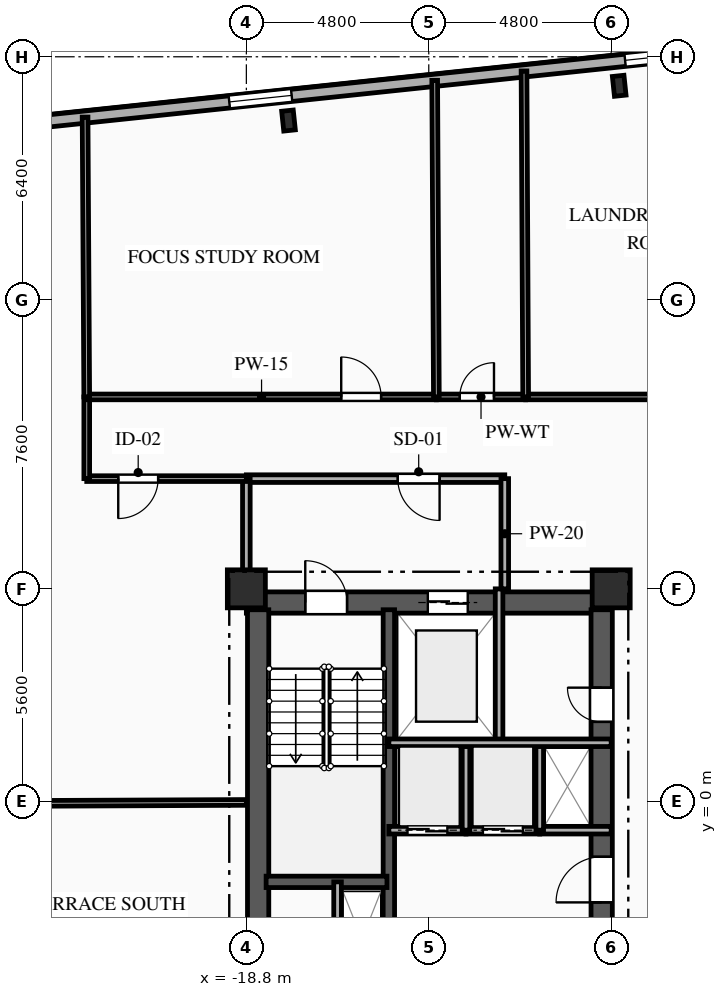
"""IFC4 building model, lengths in metres.
Left out: names, types, materials, properties, quantities, classifications, styles, units other than length and angle.
Written with IfcOpenShell. Run it as: python <this file> out.ifc"""

import sys

from ifc_helpers import new_model, si_unit, direction, frame, frame_2d, origin, origin_2d, place, context, subcontext, project, spatial, rectangle, i_section, extrude, element, fill, save


model = new_model("IFC4")
c1 = context("Model", 3, precision=1e-05, world=origin(), true_north=direction((0.0, 1.0)))
c2 = subcontext(c1, "Body", "Model", "MODEL_VIEW")
j1 = project(units=[si_unit("LENGTHUNIT", "METRE"), si_unit("PLANEANGLEUNIT", "RADIAN")], contexts=[c1])
p1 = place(None, origin())
s1 = spatial("IfcSite", under=j1, at=p1, CompositionType="ELEMENT")
p2 = place(p1, origin())
s2 = spatial("IfcBuilding", under=s1, at=p2, CompositionType="ELEMENT")
p3 = place(p2, frame((0.0, 0.0, 79.0)))
s3 = spatial("IfcBuildingStorey", under=s2, at=p3, CompositionType="ELEMENT", Elevation=79.0)
for number, where, z_axis, x_axis in (
    (1, (-18.8, 5.6, 0.0), (0.0, 0.0, 1.0), (1.0, 0.0, 0.0)),
    (2, (-9.2, 5.6, 0.0), (0.0, 0.0, 1.0), (1.0, 0.0, 0.0)),
):
    element("IfcColumn", number, at=place(p3, frame(where, z_axis=z_axis, x_axis=x_axis)), inside=s3, PredefinedType="COLUMN", context=c2, shape_type="SweptSolid", body=[
        extrude(rectangle(XDim=1.0, YDim=1.0, at=origin_2d()), origin(), (0.0, 0.0, 1.0), 3.35),
    ])
for number, where, z_axis, x_axis in (
    (3, (-8.989, 18.836, 0.0), (0.0, 0.0, 1.0), (0.995, 0.105, 0.0)),
    (4, (-17.691, 17.922, 0.0), (0.0, 0.0, 1.0), (0.995, 0.105, 0.0)),
):
    element("IfcColumn", number, at=place(p3, frame(where, z_axis=z_axis, x_axis=x_axis)), inside=s3, PredefinedType="COLUMN", context=c2, shape_type="SweptSolid", body=[
        extrude(i_section(OverallWidth=0.306, OverallDepth=0.524, WebThickness=0.021, FlangeThickness=0.04, FilletRadius=0.027, at=origin_2d()), origin(), (0.0, 0.0, 1.0), 3.35),
    ])
p4 = place(p3, frame((-27.107, 17.586, 0.0), z_axis=(0.0, 0.0, 1.0), x_axis=(0.994521628355, 0.104531003701, 0.0)))
e5 = element("IfcWall", 5, at=p4, inside=s3, PredefinedType="SOLIDWALL", context=c2, shape_type="SweptSolid", body=[
    extrude(rectangle(XDim=53.8, YDim=0.32, at=frame_2d((26.9, 0.0))), origin(), (0.0, 0.0, 1.0), 3.045),
])
p5 = place(p4, frame((1.482, 0.0, 0.85)))
e6 = element("IfcOpeningElement", 6, at=p5, cuts=e5, PredefinedType="OPENING", context=c2, shape_type="SweptSolid", body=[
    extrude(rectangle(XDim=1.6, YDim=1.85, at=frame_2d((0.8, 0.925))), frame((0.0, 0.17, 0.0), z_axis=(0.0, -1.0, 0.0), x_axis=(1.0, 0.0, 0.0)), (0.0, 0.0, 1.0), 0.34),
])
p6 = place(p4, frame((7.902, 0.0, 0.85)))
e7 = element("IfcOpeningElement", 7, at=p6, cuts=e5, PredefinedType="OPENING", context=c2, shape_type="SweptSolid", body=[
    extrude(rectangle(XDim=1.65, YDim=1.85, at=frame_2d((0.825, 0.925))), frame((0.0, 0.17, 0.0), z_axis=(0.0, -1.0, 0.0), x_axis=(1.0, 0.0, 0.0)), (0.0, 0.0, 1.0), 0.34),
])
p7 = place(p4, frame((18.374, 0.0, 0.85)))
e8 = element("IfcOpeningElement", 8, at=p7, cuts=e5, PredefinedType="OPENING", context=c2, shape_type="SweptSolid", body=[
    extrude(rectangle(XDim=1.6, YDim=1.85, at=frame_2d((0.8, 0.925))), frame((0.0, 0.17, 0.0), z_axis=(0.0, -1.0, 0.0), x_axis=(1.0, 0.0, 0.0)), (0.0, 0.0, 1.0), 0.34),
])
p8 = place(p4, frame((26.16, 0.0, 0.85)))
e9 = element("IfcOpeningElement", 9, at=p8, cuts=e5, PredefinedType="OPENING", context=c2, shape_type="SweptSolid", body=[
    extrude(rectangle(XDim=2.2, YDim=1.85, at=frame_2d((1.1, 0.925))), frame((0.0, 0.17, 0.0), z_axis=(0.0, -1.0, 0.0), x_axis=(1.0, 0.0, 0.0)), (0.0, 0.0, 1.0), 0.34),
])
p9 = place(p4, frame((35.407, 0.0, 0.85)))
e10 = element("IfcOpeningElement", 10, at=p9, cuts=e5, PredefinedType="OPENING", context=c2, shape_type="SweptSolid", body=[
    extrude(rectangle(XDim=2.2, YDim=1.85, at=frame_2d((1.1, 0.925))), frame((0.0, 0.17, 0.0), z_axis=(0.0, -1.0, 0.0), x_axis=(1.0, 0.0, 0.0)), (0.0, 0.0, 1.0), 0.34),
])
p10 = place(p4, frame((42.607, 0.0, 0.85)))
e11 = element("IfcOpeningElement", 11, at=p10, cuts=e5, PredefinedType="OPENING", context=c2, shape_type="SweptSolid", body=[
    extrude(rectangle(XDim=1.65, YDim=1.85, at=frame_2d((0.825, 0.925))), frame((0.0, 0.17, 0.0), z_axis=(0.0, -1.0, 0.0), x_axis=(1.0, 0.0, 0.0)), (0.0, 0.0, 1.0), 0.34),
])
p11 = place(p4, frame((47.211, 0.0, 0.85)))
e12 = element("IfcOpeningElement", 12, at=p11, cuts=e5, PredefinedType="OPENING", context=c2, shape_type="SweptSolid", body=[
    extrude(rectangle(XDim=1.65, YDim=1.85, at=frame_2d((0.825, 0.925))), frame((0.0, 0.17, 0.0), z_axis=(0.0, -1.0, 0.0), x_axis=(1.0, 0.0, 0.0)), (0.0, 0.0, 1.0), 0.34),
])
p12 = place(p3, frame((-18.8, 5.24, 0.0), z_axis=(0.0, 0.0, 1.0), x_axis=(1.0, 0.0, 0.0)))
e13 = element("IfcWall", 13, at=p12, inside=s3, PredefinedType="SHEAR", context=c2, shape_type="SweptSolid", body=[
    extrude(rectangle(XDim=9.6, YDim=0.56, at=frame_2d((4.8, 0.0))), origin(), (0.0, 0.0, 1.0), 3.045),
])
p13 = place(p12, frame((1.55, 0.0, 0.0)))
e14 = element("IfcOpeningElement", 14, at=p13, cuts=e13, PredefinedType="OPENING", context=c2, shape_type="SweptSolid", body=[
    extrude(rectangle(XDim=1.1, YDim=2.15, at=frame_2d((0.55, 1.075))), frame((0.0, 0.29, 0.0), z_axis=(0.0, -1.0, 0.0), x_axis=(1.0, 0.0, 0.0)), (0.0, 0.0, 1.0), 0.58),
])
p14 = place(p12, frame((4.775, 0.0, 0.0)))
e15 = element("IfcOpeningElement", 15, at=p14, cuts=e13, PredefinedType="OPENING", context=c2, shape_type="SweptSolid", body=[
    extrude(rectangle(XDim=1.05, YDim=2.1, at=frame_2d((0.525, 1.05))), frame((0.0, 0.29, 0.0), z_axis=(0.0, -1.0, 0.0), x_axis=(1.0, 0.0, 0.0)), (0.0, 0.0, 1.0), 0.58),
])
p15 = place(p3, frame((-18.49, -5.05, 0.0), z_axis=(0.0, 0.0, 1.0), x_axis=(0.0, 1.0, 0.0)))
e16 = element("IfcWall", 16, at=p15, inside=s3, PredefinedType="SHEAR", context=c2, shape_type="SweptSolid", body=[
    extrude(rectangle(XDim=10.1, YDim=0.56, at=frame_2d((5.05, 0.0))), origin(), (0.0, 0.0, 1.0), 3.045),
])
p16 = place(p3, frame((-9.45, -5.05, 0.0), z_axis=(0.0, 0.0, 1.0), x_axis=(0.0, 1.0, 0.0)))
e17 = element("IfcWall", 17, at=p16, inside=s3, PredefinedType="SHEAR", context=c2, shape_type="SweptSolid", body=[
    extrude(rectangle(XDim=10.1, YDim=0.56, at=frame_2d((5.05, 0.0))), origin(), (0.0, 0.0, 1.0), 3.045),
])
p17 = place(p16, frame((7.15, 0.0, 0.0)))
e18 = element("IfcOpeningElement", 18, at=p17, cuts=e17, PredefinedType="OPENING", context=c2, shape_type="SweptSolid", body=[
    extrude(rectangle(XDim=0.9, YDim=2.1, at=frame_2d((0.45, 1.05))), frame((0.0, 0.29, 0.0), z_axis=(0.0, -1.0, 0.0), x_axis=(1.0, 0.0, 0.0)), (0.0, 0.0, 1.0), 0.58),
])
p18 = place(p16, frame((2.4, 0.0, 0.0)))
e19 = element("IfcOpeningElement", 19, at=p18, cuts=e17, PredefinedType="OPENING", context=c2, shape_type="SweptSolid", body=[
    extrude(rectangle(XDim=1.2, YDim=2.15, at=frame_2d((0.6, 1.075))), frame((0.0, 0.29, 0.0), z_axis=(0.0, -1.0, 0.0), x_axis=(1.0, 0.0, 0.0)), (0.0, 0.0, 1.0), 0.58),
])
p19 = place(p3, frame((-15.05, -5.05, 0.0), z_axis=(0.0, 0.0, 1.0), x_axis=(0.0, 1.0, 0.0)))
e20 = element("IfcWall", 20, at=p19, inside=s3, PredefinedType="SHEAR", context=c2, shape_type="SweptSolid", body=[
    extrude(rectangle(XDim=10.1, YDim=0.3, at=frame_2d((5.05, 0.0))), origin(), (0.0, 0.0, 1.0), 3.045),
])
p20 = place(p3, frame((-18.28, -2.11, 0.0), z_axis=(0.0, 0.0, 1.0), x_axis=(1.0, 0.0, 0.0)))
e21 = element("IfcWall", 21, at=p20, inside=s3, PredefinedType="SHEAR", context=c2, shape_type="SweptSolid", body=[
    extrude(rectangle(XDim=3.18, YDim=0.3, at=frame_2d((1.59, 0.0))), origin(), (0.0, 0.0, 1.0), 3.045),
])
p21 = place(p3, frame((-16.4, -5.6, 0.0), z_axis=(0.0, 0.0, 1.0), x_axis=(0.0, 1.0, 0.0)))
e22 = element("IfcWall", 22, at=p21, inside=s3, PredefinedType="PARTITIONING", context=c2, shape_type="SweptSolid", body=[
    extrude(rectangle(XDim=3.49, YDim=0.2, at=frame_2d((1.745, 0.0))), origin(), (0.0, 0.0, 1.0), 3.045),
])
p22 = place(p3, frame((-12.15, 1.55, 0.0), z_axis=(0.0, 0.0, 1.0), x_axis=(0.0, 1.0, 0.0)))
e23 = element("IfcWall", 23, at=p22, inside=s3, PredefinedType="PARTITIONING", context=c2, shape_type="SweptSolid", body=[
    extrude(rectangle(XDim=4.05, YDim=0.2, at=frame_2d((2.025, 0.0))), origin(), (0.0, 0.0, 1.0), 3.045),
])
p23 = place(p3, frame((-12.0, 8.5, 0.0), z_axis=(0.0, 0.0, 1.0), x_axis=(-1.0, 0.0, 0.0)))
e24 = element("IfcWall", 24, at=p23, inside=s3, PredefinedType="PARTITIONING", context=c2, shape_type="SweptSolid", body=[
    extrude(rectangle(XDim=6.8, YDim=0.2, at=frame_2d((3.4, 0.0))), origin(), (0.0, 0.0, 1.0), 3.045),
])
p24 = place(p23, frame((1.715, 0.0, 0.0)))
e25 = element("IfcOpeningElement", 25, at=p24, cuts=e24, PredefinedType="OPENING", context=c2, shape_type="SweptSolid", body=[
    extrude(rectangle(XDim=1.1, YDim=2.15, at=frame_2d((0.55, 1.075))), frame((0.0, 0.11, 0.0), z_axis=(0.0, -1.0, 0.0), x_axis=(1.0, 0.0, 0.0)), (0.0, 0.0, 1.0), 0.22),
])
p25 = place(p3, frame((-12.0, 5.6, 0.0), z_axis=(0.0, 0.0, 1.0), x_axis=(0.0, 1.0, 0.0)))
e26 = element("IfcWall", 26, at=p25, inside=s3, PredefinedType="PARTITIONING", context=c2, shape_type="SweptSolid", body=[
    extrude(rectangle(XDim=2.9, YDim=0.2, at=frame_2d((1.45, 0.0))), origin(), (0.0, 0.0, 1.0), 3.045),
])
p26 = place(p3, frame((-18.8, 8.5, 0.0), z_axis=(0.0, 0.0, 1.0), x_axis=(0.0, -1.0, 0.0)))
e27 = element("IfcWall", 27, at=p26, inside=s3, PredefinedType="PARTITIONING", context=c2, shape_type="SweptSolid", body=[
    extrude(rectangle(XDim=2.9, YDim=0.2, at=frame_2d((1.45, 0.0))), origin(), (0.0, 0.0, 1.0), 2.53),
])
p27 = place(p3, frame((-13.02, -0.75, 0.0), z_axis=(0.0, 0.0, 1.0), x_axis=(-1.0, 0.0, 0.0)))
e28 = element("IfcWall", 28, at=p27, inside=s3, PredefinedType="PARTITIONING", context=c2, shape_type="SweptSolid", body=[
    extrude(rectangle(XDim=2.03, YDim=0.2, at=frame_2d((1.015, 0.0))), origin(), (0.0, 0.0, 1.0), 3.045),
])
p28 = place(p27, frame((0.49, 0.0, 0.0)))
e29 = element("IfcOpeningElement", 29, at=p28, cuts=e28, PredefinedType="OPENING", context=c2, shape_type="SweptSolid", body=[
    extrude(rectangle(XDim=1.05, YDim=2.1, at=frame_2d((0.525, 1.05))), frame((0.0, 0.11, 0.0), z_axis=(0.0, -1.0, 0.0), x_axis=(1.0, 0.0, 0.0)), (0.0, 0.0, 1.0), 0.22),
])
p29 = place(p3, frame((-11.08, -0.75, 0.0), z_axis=(0.0, 0.0, 1.0), x_axis=(-1.0, 0.0, 0.0)))
e30 = element("IfcWall", 30, at=p29, inside=s3, PredefinedType="PARTITIONING", context=c2, shape_type="SweptSolid", body=[
    extrude(rectangle(XDim=1.94, YDim=0.2, at=frame_2d((0.97, 0.0))), origin(), (0.0, 0.0, 1.0), 3.045),
])
p30 = place(p29, frame((0.445, 0.0, 0.0)))
e31 = element("IfcOpeningElement", 31, at=p30, cuts=e30, PredefinedType="OPENING", context=c2, shape_type="SweptSolid", body=[
    extrude(rectangle(XDim=1.05, YDim=2.1, at=frame_2d((0.525, 1.05))), frame((0.0, 0.11, 0.0), z_axis=(0.0, -1.0, 0.0), x_axis=(1.0, 0.0, 0.0)), (0.0, 0.0, 1.0), 0.22),
])
p31 = place(p3, frame((-9.2, -0.75, 0.0), z_axis=(0.0, 0.0, 1.0), x_axis=(-1.0, 0.0, 0.0)))
e32 = element("IfcWall", 32, at=p31, inside=s3, PredefinedType="PARTITIONING", context=c2, shape_type="SweptSolid", body=[
    extrude(rectangle(XDim=1.88, YDim=0.2, at=frame_2d((0.94, 0.0))), origin(), (0.0, 0.0, 1.0), 3.045),
])
for number, where, z_axis, x_axis in (
    (33, (-13.02, -0.75, 0.0), (0.0, 0.0, 1.0), (0.0, 1.0, 0.0)),
    (34, (-11.08, -0.75, 0.0), (0.0, 0.0, 1.0), (0.0, 1.0, 0.0)),
):
    element("IfcWall", number, at=place(p3, frame(where, z_axis=z_axis, x_axis=x_axis)), inside=s3, PredefinedType="PARTITIONING", context=c2, shape_type="SweptSolid", body=[
        extrude(rectangle(XDim=2.3, YDim=0.2, at=frame_2d((1.15, 0.0))), origin(), (0.0, 0.0, 1.0), 3.045),
    ])
p32 = place(p3, frame((-18.8, 8.5, 0.0), z_axis=(0.0, 0.0, 1.0), x_axis=(-1.0, 0.0, 0.0)))
e35 = element("IfcWall", 35, at=p32, inside=s3, PredefinedType="PARTITIONING", context=c2, shape_type="SweptSolid", body=[
    extrude(rectangle(XDim=4.2, YDim=0.15, at=frame_2d((2.1, 0.0))), origin(), (0.0, 0.0, 1.0), 3.045),
])
p33 = place(p32, frame((2.321, 0.0, 0.0)))
e36 = element("IfcOpeningElement", 36, at=p33, cuts=e35, PredefinedType="OPENING", context=c2, shape_type="SweptSolid", body=[
    extrude(rectangle(XDim=1.05, YDim=2.15, at=frame_2d((0.525, 1.075))), frame((0.0, 0.085, 0.0), z_axis=(0.0, -1.0, 0.0), x_axis=(1.0, 0.0, 0.0)), (0.0, 0.0, 1.0), 0.17),
])
p34 = place(p3, frame((-23.0, 8.5, 0.0), z_axis=(0.0, 0.0, 1.0), x_axis=(0.0, 1.0, 0.0)))
e37 = element("IfcWall", 37, at=p34, inside=s3, PredefinedType="PARTITIONING", context=c2, shape_type="SweptSolid", body=[
    extrude(rectangle(XDim=2.15, YDim=0.15, at=frame_2d((1.075, 0.0))), origin(), (0.0, 0.0, 1.0), 3.045),
])
p35 = place(p3, frame((-23.0, 10.65, 0.0), z_axis=(0.0, 0.0, 1.0), x_axis=(1.0, 0.0, 0.0)))
e38 = element("IfcWall", 38, at=p35, inside=s3, PredefinedType="PARTITIONING", context=c2, shape_type="SweptSolid", body=[
    extrude(rectangle(XDim=9.2, YDim=0.15, at=frame_2d((4.6, 0.0))), origin(), (0.0, 0.0, 1.0), 3.045),
])
p36 = place(p35, frame((6.696, 0.0, 0.0)))
e39 = element("IfcOpeningElement", 39, at=p36, cuts=e38, PredefinedType="OPENING", context=c2, shape_type="SweptSolid", body=[
    extrude(rectangle(XDim=1.05, YDim=2.15, at=frame_2d((0.525, 1.075))), frame((0.0, 0.085, 0.0), z_axis=(0.0, -1.0, 0.0), x_axis=(1.0, 0.0, 0.0)), (0.0, 0.0, 1.0), 0.17),
])
p37 = place(p3, frame((-13.8, 10.65, 0.0), z_axis=(0.0, 0.0, 1.0), x_axis=(1.0, 0.0, 0.0)))
e40 = element("IfcWall", 40, at=p37, inside=s3, PredefinedType="PLUMBINGWALL", context=c2, shape_type="SweptSolid", body=[
    extrude(rectangle(XDim=2.35, YDim=0.15, at=frame_2d((1.175, 0.0))), origin(), (0.0, 0.0, 1.0), 3.045),
])
p38 = place(p37, frame((0.616, 0.0, 0.0)))
e41 = element("IfcOpeningElement", 41, at=p38, cuts=e40, PredefinedType="OPENING", context=c2, shape_type="SweptSolid", body=[
    extrude(rectangle(XDim=0.9, YDim=2.1, at=frame_2d((0.45, 1.05))), frame((0.0, 0.085, 0.0), z_axis=(0.0, -1.0, 0.0), x_axis=(1.0, 0.0, 0.0)), (0.0, 0.0, 1.0), 0.17),
])
p39 = place(p3, frame((-11.45, 10.65, 0.0), z_axis=(0.0, 0.0, 1.0), x_axis=(1.0, 0.0, 0.0)))
e42 = element("IfcWall", 42, at=p39, inside=s3, PredefinedType="PARTITIONING", context=c2, shape_type="SweptSolid", body=[
    extrude(rectangle(XDim=6.85, YDim=0.15, at=frame_2d((3.425, 0.0))), origin(), (0.0, 0.0, 1.0), 3.045),
])
p40 = place(p39, frame((4.728, 0.0, 0.0)))
e43 = element("IfcOpeningElement", 43, at=p40, cuts=e42, PredefinedType="OPENING", context=c2, shape_type="SweptSolid", body=[
    extrude(rectangle(XDim=0.95, YDim=2.1, at=frame_2d((0.475, 1.05))), frame((0.0, 0.085, 0.0), z_axis=(0.0, -1.0, 0.0), x_axis=(1.0, 0.0, 0.0)), (0.0, 0.0, 1.0), 0.17),
])
p41 = place(p3, frame((-28.671, -0.064, 0.0), z_axis=(0.0, 0.0, 1.0), x_axis=(0.999990089865, 0.004451985263, 0.0)))
e44 = element("IfcWall", 44, at=p41, inside=s3, PredefinedType="PARTITIONING", context=c2, shape_type="SweptSolid", body=[
    extrude(rectangle(XDim=9.871, YDim=0.15, at=frame_2d((4.936, 0.0))), origin(), (0.0, 0.0, 1.0), 3.045),
])
p42 = place(p3, frame((-23.044, 18.013, 0.0), z_axis=(0.0, 0.0, 1.0), x_axis=(0.005968459246, -0.999982188588, 0.0)))
e45 = element("IfcWall", 45, at=p42, inside=s3, PredefinedType="PARTITIONING", context=c2, shape_type="SweptSolid", body=[
    extrude(rectangle(XDim=7.363, YDim=0.15, at=frame_2d((3.682, 0.0))), origin(), (0.0, 0.0, 1.0), 3.045),
])
p43 = place(p3, frame((-13.844, 18.98, 0.0), z_axis=(0.0, 0.0, 1.0), x_axis=(0.005275579446, -0.999986084034, 0.0)))
e46 = element("IfcWall", 46, at=p43, inside=s3, PredefinedType="PLUMBINGWALL", context=c2, shape_type="SweptSolid", body=[
    extrude(rectangle(XDim=8.33, YDim=0.15, at=frame_2d((4.165, 0.0))), origin(), (0.0, 0.0, 1.0), 3.045),
])
p44 = place(p3, frame((-11.494, 19.227, 0.0), z_axis=(0.0, 0.0, 1.0), x_axis=(0.005123612688, -0.99998687421, 0.0)))
e47 = element("IfcWall", 47, at=p44, inside=s3, PredefinedType="PLUMBINGWALL", context=c2, shape_type="SweptSolid", body=[
    extrude(rectangle(XDim=8.577, YDim=0.15, at=frame_2d((4.289, 0.0))), origin(), (0.0, 0.0, 1.0), 3.045),
])
p45 = place(p3, frame((-15.05, 1.55, 0.0), z_axis=(0.0, 0.0, 1.0), x_axis=(1.0, 0.0, 0.0)))
e48 = element("IfcWall", 48, at=p45, inside=s3, PredefinedType="PARTITIONING", context=c2, shape_type="SweptSolid", body=[
    extrude(rectangle(XDim=5.85, YDim=0.2, at=frame_2d((2.925, 0.0))), origin(), (0.0, 0.0, 1.0), 3.045),
])
p46 = place(p6, origin())
e49 = element("IfcWindow", 49, at=p46, inside=s3, PartitioningType="SINGLE_PANEL", PredefinedType="WINDOW", context=c2, shape_type="SweptSolid", body=[
    extrude(rectangle(XDim=1.65, YDim=1.85, at=frame_2d((0.825, 0.925))), frame((0.0, 0.03, 0.0), z_axis=(0.0, -1.0, 0.0), x_axis=(1.0, 0.0, 0.0)), (0.0, 0.0, 1.0), 0.06),
])
fill(e7, e49)
p47 = place(p7, origin())
e50 = element("IfcWindow", 50, at=p47, inside=s3, PartitioningType="SINGLE_PANEL", PredefinedType="WINDOW", context=c2, shape_type="SweptSolid", body=[
    extrude(rectangle(XDim=1.6, YDim=1.85, at=frame_2d((0.8, 0.925))), frame((0.0, 0.03, 0.0), z_axis=(0.0, -1.0, 0.0), x_axis=(1.0, 0.0, 0.0)), (0.0, 0.0, 1.0), 0.06),
])
fill(e8, e50)
p48 = place(p13, origin())
e51 = element("IfcDoor", 51, at=p48, inside=s3, OperationType="SINGLE_SWING_LEFT", PredefinedType="DOOR", context=c2, shape_type="SweptSolid", body=[
    extrude(rectangle(XDim=1.1, YDim=2.15, at=frame_2d((0.55, 1.075))), frame((0.0, 0.025, 0.0), z_axis=(0.0, -1.0, 0.0), x_axis=(1.0, 0.0, 0.0)), (0.0, 0.0, 1.0), 0.05),
])
fill(e14, e51)
p49 = place(p14, origin())
e52 = element("IfcDoor", 52, at=p49, inside=s3, OperationType="DOUBLE_DOOR_SLIDING", PredefinedType="DOOR", context=c2, shape_type="SweptSolid", body=[
    extrude(rectangle(XDim=1.05, YDim=2.1, at=frame_2d((0.525, 1.05))), frame((0.0, 0.025, 0.0), z_axis=(0.0, -1.0, 0.0), x_axis=(1.0, 0.0, 0.0)), (0.0, 0.0, 1.0), 0.05),
])
fill(e15, e52)
p50 = place(p24, origin())
e53 = element("IfcDoor", 53, at=p50, inside=s3, OperationType="SINGLE_SWING_LEFT", PredefinedType="DOOR", context=c2, shape_type="SweptSolid", body=[
    extrude(rectangle(XDim=1.1, YDim=2.15, at=frame_2d((0.55, 1.075))), frame((0.0, 0.025, 0.0), z_axis=(0.0, -1.0, 0.0), x_axis=(1.0, 0.0, 0.0)), (0.0, 0.0, 1.0), 0.05),
])
fill(e25, e53)
p51 = place(p17, origin())
e54 = element("IfcDoor", 54, at=p51, inside=s3, OperationType="SINGLE_SWING_RIGHT", PredefinedType="DOOR", context=c2, shape_type="SweptSolid", body=[
    extrude(rectangle(XDim=0.9, YDim=2.1, at=frame_2d((0.45, 1.05))), frame((0.0, 0.025, 0.0), z_axis=(0.0, -1.0, 0.0), x_axis=(1.0, 0.0, 0.0)), (0.0, 0.0, 1.0), 0.05),
])
fill(e18, e54)
p52 = place(p28, origin())
e55 = element("IfcDoor", 55, at=p52, inside=s3, OperationType="DOUBLE_DOOR_SLIDING", PredefinedType="DOOR", context=c2, shape_type="SweptSolid", body=[
    extrude(rectangle(XDim=1.05, YDim=2.1, at=frame_2d((0.525, 1.05))), frame((0.0, 0.025, 0.0), z_axis=(0.0, -1.0, 0.0), x_axis=(1.0, 0.0, 0.0)), (0.0, 0.0, 1.0), 0.05),
])
fill(e29, e55)
p53 = place(p30, origin())
e56 = element("IfcDoor", 56, at=p53, inside=s3, OperationType="DOUBLE_DOOR_SLIDING", PredefinedType="DOOR", context=c2, shape_type="SweptSolid", body=[
    extrude(rectangle(XDim=1.05, YDim=2.1, at=frame_2d((0.525, 1.05))), frame((0.0, 0.025, 0.0), z_axis=(0.0, -1.0, 0.0), x_axis=(1.0, 0.0, 0.0)), (0.0, 0.0, 1.0), 0.05),
])
fill(e31, e56)
p54 = place(p18, origin())
e57 = element("IfcDoor", 57, at=p54, inside=s3, OperationType="SINGLE_SWING_LEFT", PredefinedType="DOOR", context=c2, shape_type="SweptSolid", body=[
    extrude(rectangle(XDim=1.2, YDim=2.15, at=frame_2d((0.6, 1.075))), frame((0.0, 0.025, 0.0), z_axis=(0.0, -1.0, 0.0), x_axis=(1.0, 0.0, 0.0)), (0.0, 0.0, 1.0), 0.05),
])
fill(e19, e57)
p55 = place(p33, origin())
e58 = element("IfcDoor", 58, at=p55, inside=s3, OperationType="SINGLE_SWING_RIGHT", PredefinedType="DOOR", context=c2, shape_type="SweptSolid", body=[
    extrude(rectangle(XDim=1.05, YDim=2.15, at=frame_2d((0.525, 1.075))), frame((0.0, 0.025, 0.0), z_axis=(0.0, -1.0, 0.0), x_axis=(1.0, 0.0, 0.0)), (0.0, 0.0, 1.0), 0.05),
])
fill(e36, e58)
p56 = place(p36, origin())
e59 = element("IfcDoor", 59, at=p56, inside=s3, OperationType="SINGLE_SWING_LEFT", PredefinedType="DOOR", context=c2, shape_type="SweptSolid", body=[
    extrude(rectangle(XDim=1.05, YDim=2.15, at=frame_2d((0.525, 1.075))), frame((0.0, 0.025, 0.0), z_axis=(0.0, -1.0, 0.0), x_axis=(1.0, 0.0, 0.0)), (0.0, 0.0, 1.0), 0.05),
])
fill(e39, e59)
p57 = place(p38, origin())
e60 = element("IfcDoor", 60, at=p57, inside=s3, OperationType="SINGLE_SWING_RIGHT", PredefinedType="DOOR", context=c2, shape_type="SweptSolid", body=[
    extrude(rectangle(XDim=0.9, YDim=2.1, at=frame_2d((0.45, 1.05))), frame((0.0, 0.025, 0.0), z_axis=(0.0, -1.0, 0.0), x_axis=(1.0, 0.0, 0.0)), (0.0, 0.0, 1.0), 0.05),
])
fill(e41, e60)
save(model, sys.argv[1])
